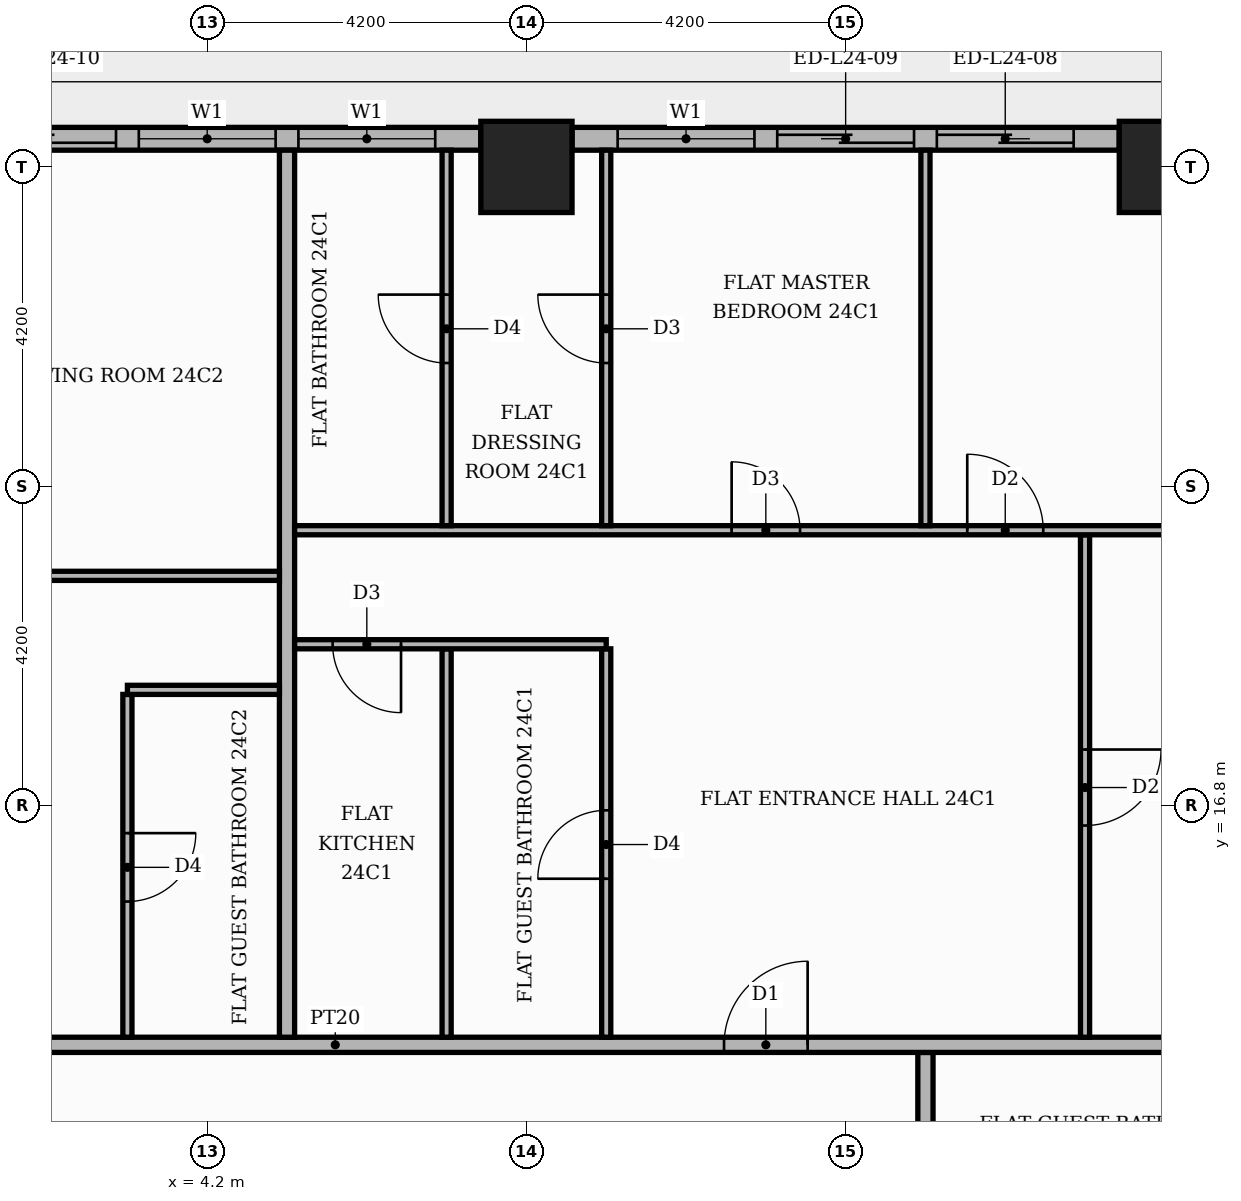
"""IFC4 building model, lengths in metres.
Left out: names, types, materials, properties, quantities, classifications, styles, units other than length and angle.
Written with IfcOpenShell. Run it as: python <this file> out.ifc"""

import sys

from ifc_helpers import new_model, si_unit, direction, frame, frame_2d, origin, origin_2d, place, context, subcontext, project, spatial, rectangle, extrude, element, fill, save


model = new_model("IFC4")
c1 = context("Model", 3, precision=1e-05, world=origin(), true_north=direction((0.0, 1.0)))
c2 = subcontext(c1, "Body", "Model", "MODEL_VIEW")
j1 = project(units=[si_unit("LENGTHUNIT", "METRE"), si_unit("PLANEANGLEUNIT", "RADIAN")], contexts=[c1])
p1 = place(None, origin())
s1 = spatial("IfcSite", under=j1, at=p1, CompositionType="ELEMENT")
p2 = place(p1, origin())
s2 = spatial("IfcBuilding", under=s1, at=p2, CompositionType="ELEMENT")
p3 = place(p2, frame((0.0, 0.0, 102.6)))
s3 = spatial("IfcBuildingStorey", under=s2, at=p3, CompositionType="ELEMENT", Elevation=102.6)
for number, where, z_axis, x_axis in (
    (1, (8.4, 25.2, 0.0), (0.0, 0.0, 1.0), (1.0, 0.0, 0.0)),
    (2, (16.8, 25.2, 0.0), (0.0, 0.0, 1.0), (1.0, 0.0, 0.0)),
):
    element("IfcColumn", number, at=place(p3, frame(where, z_axis=z_axis, x_axis=x_axis)), inside=s3, PredefinedType="COLUMN", context=c2, shape_type="SweptSolid", body=[
        extrude(rectangle(XDim=1.2, YDim=1.2, at=origin_2d()), origin(), (0.0, 0.0, 1.0), 3.9),
    ])
p4 = place(p3, frame((16.2, 25.57, 0.0), z_axis=(0.0, 0.0, 1.0), x_axis=(-1.0, 0.0, 0.0)))
e3 = element("IfcWall", 3, at=p4, inside=s3, PredefinedType="STANDARD", context=c2, shape_type="SweptSolid", body=[
    extrude(rectangle(XDim=7.2, YDim=0.3, at=frame_2d((3.6, 0.0))), origin(), (0.0, 0.0, 1.0), 3.48),
])
p5 = place(p4, frame((0.6, 0.0, 0.0)))
e4 = element("IfcOpeningElement", 4, at=p5, cuts=e3, PredefinedType="OPENING", context=c2, shape_type="SweptSolid", body=[
    extrude(rectangle(XDim=1.8, YDim=2.4, at=frame_2d((0.9, 1.2))), frame((0.0, 0.16, 0.0), z_axis=(0.0, -1.0, 0.0), x_axis=(1.0, 0.0, 0.0)), (0.0, 0.0, 1.0), 0.32),
])
p6 = place(p4, frame((2.7, 0.0, 0.0)))
e5 = element("IfcOpeningElement", 5, at=p6, cuts=e3, PredefinedType="OPENING", context=c2, shape_type="SweptSolid", body=[
    extrude(rectangle(XDim=1.8, YDim=2.4, at=frame_2d((0.9, 1.2))), frame((0.0, 0.16, 0.0), z_axis=(0.0, -1.0, 0.0), x_axis=(1.0, 0.0, 0.0)), (0.0, 0.0, 1.0), 0.32),
])
p7 = place(p4, frame((4.8, 0.0, 0.9)))
e6 = element("IfcOpeningElement", 6, at=p7, cuts=e3, PredefinedType="OPENING", context=c2, shape_type="SweptSolid", body=[
    extrude(rectangle(XDim=1.8, YDim=2.1, at=frame_2d((0.9, 1.05))), frame((0.0, 0.16, 0.0), z_axis=(0.0, -1.0, 0.0), x_axis=(1.0, 0.0, 0.0)), (0.0, 0.0, 1.0), 0.32),
])
p8 = place(p3, frame((7.8, 25.57, 0.0), z_axis=(0.0, 0.0, 1.0), x_axis=(-1.0, 0.0, 0.0)))
e7 = element("IfcWall", 7, at=p8, inside=s3, PredefinedType="STANDARD", context=c2, shape_type="SweptSolid", body=[
    extrude(rectangle(XDim=7.2, YDim=0.3, at=frame_2d((3.6, 0.0))), origin(), (0.0, 0.0, 1.0), 3.48),
])
p9 = place(p8, frame((0.6, 0.0, 0.9)))
e8 = element("IfcOpeningElement", 8, at=p9, cuts=e7, PredefinedType="OPENING", context=c2, shape_type="SweptSolid", body=[
    extrude(rectangle(XDim=1.8, YDim=2.1, at=frame_2d((0.9, 1.05))), frame((0.0, 0.16, 0.0), z_axis=(0.0, -1.0, 0.0), x_axis=(1.0, 0.0, 0.0)), (0.0, 0.0, 1.0), 0.32),
])
p10 = place(p8, frame((2.7, 0.0, 0.9)))
e9 = element("IfcOpeningElement", 9, at=p10, cuts=e7, PredefinedType="OPENING", context=c2, shape_type="SweptSolid", body=[
    extrude(rectangle(XDim=1.8, YDim=2.1, at=frame_2d((0.9, 1.05))), frame((0.0, 0.16, 0.0), z_axis=(0.0, -1.0, 0.0), x_axis=(1.0, 0.0, 0.0)), (0.0, 0.0, 1.0), 0.32),
])
p11 = place(p8, frame((4.8, 0.0, 0.0)))
e10 = element("IfcOpeningElement", 10, at=p11, cuts=e7, PredefinedType="OPENING", context=c2, shape_type="SweptSolid", body=[
    extrude(rectangle(XDim=1.8, YDim=2.4, at=frame_2d((0.9, 1.2))), frame((0.0, 0.16, 0.0), z_axis=(0.0, -1.0, 0.0), x_axis=(1.0, 0.0, 0.0)), (0.0, 0.0, 1.0), 0.32),
])
p12 = place(p3, frame((13.65, -5.15, 0.0), z_axis=(0.0, 0.0, 1.0), x_axis=(0.0, 1.0, 0.0)))
e11 = element("IfcWall", 11, at=p12, inside=s3, PredefinedType="PARTITIONING", context=c2, shape_type="SweptSolid", body=[
    extrude(rectangle(XDim=18.7, YDim=0.2, at=frame_2d((9.35, 0.0))), origin(), (0.0, 0.0, 1.0), 3.48),
])
p13 = place(p12, frame((1.45, 0.0, 0.0)))
e12 = element("IfcOpeningElement", 12, at=p13, cuts=e11, PredefinedType="OPENING", context=c2, shape_type="SweptSolid", body=[
    extrude(rectangle(XDim=1.1, YDim=2.4, at=frame_2d((0.55, 1.2))), frame((0.0, 0.11, 0.0), z_axis=(0.0, -1.0, 0.0), x_axis=(1.0, 0.0, 0.0)), (0.0, 0.0, 1.0), 0.22),
])
p14 = place(p3, frame((-13.65, 13.65, 0.0), z_axis=(0.0, 0.0, 1.0), x_axis=(1.0, 0.0, 0.0)))
e13 = element("IfcWall", 13, at=p14, inside=s3, PredefinedType="PARTITIONING", context=c2, shape_type="SweptSolid", body=[
    extrude(rectangle(XDim=39.07, YDim=0.2, at=frame_2d((19.535, 0.0))), origin(), (0.0, 0.0, 1.0), 3.48),
])
p15 = place(p14, frame((24.65, 0.0, 0.0)))
e14 = element("IfcOpeningElement", 14, at=p15, cuts=e13, PredefinedType="OPENING", context=c2, shape_type="SweptSolid", body=[
    extrude(rectangle(XDim=1.1, YDim=2.4, at=frame_2d((0.55, 1.2))), frame((0.0, 0.11, 0.0), z_axis=(0.0, -1.0, 0.0), x_axis=(1.0, 0.0, 0.0)), (0.0, 0.0, 1.0), 0.22),
])
p16 = place(p14, frame((14.15, 0.0, 0.0)))
e15 = element("IfcOpeningElement", 15, at=p16, cuts=e13, PredefinedType="OPENING", context=c2, shape_type="SweptSolid", body=[
    extrude(rectangle(XDim=1.1, YDim=2.4, at=frame_2d((0.55, 1.2))), frame((0.0, 0.11, 0.0), z_axis=(0.0, -1.0, 0.0), x_axis=(1.0, 0.0, 0.0)), (0.0, 0.0, 1.0), 0.22),
])
p17 = place(p3, frame((3.15, 13.75, 0.0), z_axis=(0.0, 0.0, 1.0), x_axis=(0.0, 1.0, 0.0)))
e16 = element("IfcWall", 16, at=p17, inside=s3, PredefinedType="PARTITIONING", context=c2, shape_type="SweptSolid", body=[
    extrude(rectangle(XDim=4.51, YDim=0.12, at=frame_2d((2.255, 0.0))), origin(), (0.0, 0.0, 1.0), 3.48),
])
p18 = place(p17, frame((1.785, 0.0, 0.0)))
e17 = element("IfcOpeningElement", 17, at=p18, cuts=e16, PredefinedType="OPENING", context=c2, shape_type="SweptSolid", body=[
    extrude(rectangle(XDim=0.9, YDim=2.1, at=frame_2d((0.45, 1.05))), frame((0.0, 0.07, 0.0), z_axis=(0.0, -1.0, 0.0), x_axis=(1.0, 0.0, 0.0)), (0.0, 0.0, 1.0), 0.14),
])
p19 = place(p3, frame((5.25, 13.75, 0.0), z_axis=(0.0, 0.0, 1.0), x_axis=(0.0, 1.0, 0.0)))
e18 = element("IfcWall", 18, at=p19, inside=s3, PredefinedType="PARTITIONING", context=c2, shape_type="SweptSolid", body=[
    extrude(rectangle(XDim=11.67, YDim=0.2, at=frame_2d((5.835, 0.0))), origin(), (0.0, 0.0, 1.0), 3.48),
])
p20 = place(p3, frame((7.35, 13.75, 0.0), z_axis=(0.0, 0.0, 1.0), x_axis=(0.0, 1.0, 0.0)))
e19 = element("IfcWall", 19, at=p20, inside=s3, PredefinedType="PARTITIONING", context=c2, shape_type="SweptSolid", body=[
    extrude(rectangle(XDim=5.11, YDim=0.12, at=frame_2d((2.555, 0.0))), origin(), (0.0, 0.0, 1.0), 3.48),
])
p21 = place(p3, frame((9.45, 13.75, 0.0), z_axis=(0.0, 0.0, 1.0), x_axis=(0.0, 1.0, 0.0)))
e20 = element("IfcWall", 20, at=p21, inside=s3, PredefinedType="PARTITIONING", context=c2, shape_type="SweptSolid", body=[
    extrude(rectangle(XDim=5.11, YDim=0.12, at=frame_2d((2.555, 0.0))), origin(), (0.0, 0.0, 1.0), 3.48),
])
p22 = place(p21, frame((2.085, 0.0, 0.0)))
e21 = element("IfcOpeningElement", 21, at=p22, cuts=e20, PredefinedType="OPENING", context=c2, shape_type="SweptSolid", body=[
    extrude(rectangle(XDim=0.9, YDim=2.1, at=frame_2d((0.45, 1.05))), frame((0.0, 0.07, 0.0), z_axis=(0.0, -1.0, 0.0), x_axis=(1.0, 0.0, 0.0)), (0.0, 0.0, 1.0), 0.14),
])
p23 = place(p3, frame((15.75, 13.75, 0.0), z_axis=(0.0, 0.0, 1.0), x_axis=(0.0, 1.0, 0.0)))
e22 = element("IfcWall", 22, at=p23, inside=s3, PredefinedType="PARTITIONING", context=c2, shape_type="SweptSolid", body=[
    extrude(rectangle(XDim=6.61, YDim=0.12, at=frame_2d((3.305, 0.0))), origin(), (0.0, 0.0, 1.0), 3.48),
])
p24 = place(p23, frame((2.785, 0.0, 0.0)))
e23 = element("IfcOpeningElement", 23, at=p24, cuts=e22, PredefinedType="OPENING", context=c2, shape_type="SweptSolid", body=[
    extrude(rectangle(XDim=1.0, YDim=2.1, at=frame_2d((0.5, 1.05))), frame((0.0, 0.07, 0.0), z_axis=(0.0, -1.0, 0.0), x_axis=(1.0, 0.0, 0.0)), (0.0, 0.0, 1.0), 0.14),
])
p25 = place(p3, frame((3.15, 18.32, 0.0), z_axis=(0.0, 0.0, 1.0), x_axis=(1.0, 0.0, 0.0)))
e24 = element("IfcWall", 24, at=p25, inside=s3, PredefinedType="PARTITIONING", context=c2, shape_type="SweptSolid", body=[
    extrude(rectangle(XDim=2.0, YDim=0.12, at=frame_2d((1.0, 0.0))), origin(), (0.0, 0.0, 1.0), 3.48),
])
p26 = place(p3, frame((5.35, 18.92, 0.0), z_axis=(0.0, 0.0, 1.0), x_axis=(1.0, 0.0, 0.0)))
e25 = element("IfcWall", 25, at=p26, inside=s3, PredefinedType="PARTITIONING", context=c2, shape_type="SweptSolid", body=[
    extrude(rectangle(XDim=4.1, YDim=0.12, at=frame_2d((2.05, 0.0))), origin(), (0.0, 0.0, 1.0), 3.48),
])
p27 = place(p26, frame((0.5, 0.0, 0.0)))
e26 = element("IfcOpeningElement", 26, at=p27, cuts=e25, PredefinedType="OPENING", context=c2, shape_type="SweptSolid", body=[
    extrude(rectangle(XDim=0.9, YDim=2.1, at=frame_2d((0.45, 1.05))), frame((0.0, 0.07, 0.0), z_axis=(0.0, -1.0, 0.0), x_axis=(1.0, 0.0, 0.0)), (0.0, 0.0, 1.0), 0.14),
])
p28 = place(p3, frame((-13.55, 19.82, 0.0), z_axis=(0.0, 0.0, 1.0), x_axis=(1.0, 0.0, 0.0)))
e27 = element("IfcWall", 27, at=p28, inside=s3, PredefinedType="PARTITIONING", context=c2, shape_type="SweptSolid", body=[
    extrude(rectangle(XDim=18.7, YDim=0.12, at=frame_2d((9.35, 0.0))), origin(), (0.0, 0.0, 1.0), 3.48),
])
p29 = place(p28, frame((14.1, 0.0, 0.0)))
e28 = element("IfcOpeningElement", 28, at=p29, cuts=e27, PredefinedType="OPENING", context=c2, shape_type="SweptSolid", body=[
    extrude(rectangle(XDim=1.0, YDim=2.1, at=frame_2d((0.5, 1.05))), frame((0.0, 0.07, 0.0), z_axis=(0.0, -1.0, 0.0), x_axis=(1.0, 0.0, 0.0)), (0.0, 0.0, 1.0), 0.14),
])
p30 = place(p28, frame((6.8, 0.0, 0.0)))
e29 = element("IfcOpeningElement", 29, at=p30, cuts=e27, PredefinedType="OPENING", context=c2, shape_type="SweptSolid", body=[
    extrude(rectangle(XDim=0.9, YDim=2.1, at=frame_2d((0.45, 1.05))), frame((0.0, 0.07, 0.0), z_axis=(0.0, -1.0, 0.0), x_axis=(1.0, 0.0, 0.0)), (0.0, 0.0, 1.0), 0.14),
])
p31 = place(p3, frame((5.35, 20.42, 0.0), z_axis=(0.0, 0.0, 1.0), x_axis=(1.0, 0.0, 0.0)))
e30 = element("IfcWall", 30, at=p31, inside=s3, PredefinedType="PARTITIONING", context=c2, shape_type="SweptSolid", body=[
    extrude(rectangle(XDim=20.07, YDim=0.12, at=frame_2d((10.035, 0.0))), origin(), (0.0, 0.0, 1.0), 3.48),
])
p32 = place(p31, frame((8.85, 0.0, 0.0)))
e31 = element("IfcOpeningElement", 31, at=p32, cuts=e30, PredefinedType="OPENING", context=c2, shape_type="SweptSolid", body=[
    extrude(rectangle(XDim=1.0, YDim=2.1, at=frame_2d((0.5, 1.05))), frame((0.0, 0.07, 0.0), z_axis=(0.0, -1.0, 0.0), x_axis=(1.0, 0.0, 0.0)), (0.0, 0.0, 1.0), 0.14),
])
p33 = place(p31, frame((5.75, 0.0, 0.0)))
e32 = element("IfcOpeningElement", 32, at=p33, cuts=e30, PredefinedType="OPENING", context=c2, shape_type="SweptSolid", body=[
    extrude(rectangle(XDim=0.9, YDim=2.1, at=frame_2d((0.45, 1.05))), frame((0.0, 0.07, 0.0), z_axis=(0.0, -1.0, 0.0), x_axis=(1.0, 0.0, 0.0)), (0.0, 0.0, 1.0), 0.14),
])
p34 = place(p3, frame((7.35, 20.48, 0.0), z_axis=(0.0, 0.0, 1.0), x_axis=(0.0, 1.0, 0.0)))
e33 = element("IfcWall", 33, at=p34, inside=s3, PredefinedType="PARTITIONING", context=c2, shape_type="SweptSolid", body=[
    extrude(rectangle(XDim=4.94, YDim=0.12, at=frame_2d((2.47, 0.0))), origin(), (0.0, 0.0, 1.0), 3.48),
])
p35 = place(p34, frame((2.14, 0.0, 0.0)))
e34 = element("IfcOpeningElement", 34, at=p35, cuts=e33, PredefinedType="OPENING", context=c2, shape_type="SweptSolid", body=[
    extrude(rectangle(XDim=0.9, YDim=2.1, at=frame_2d((0.45, 1.05))), frame((0.0, 0.07, 0.0), z_axis=(0.0, -1.0, 0.0), x_axis=(1.0, 0.0, 0.0)), (0.0, 0.0, 1.0), 0.14),
])
p36 = place(p3, frame((9.45, 20.48, 0.0), z_axis=(0.0, 0.0, 1.0), x_axis=(0.0, 1.0, 0.0)))
e35 = element("IfcWall", 35, at=p36, inside=s3, PredefinedType="PARTITIONING", context=c2, shape_type="SweptSolid", body=[
    extrude(rectangle(XDim=4.94, YDim=0.12, at=frame_2d((2.47, 0.0))), origin(), (0.0, 0.0, 1.0), 3.48),
])
p37 = place(p36, frame((2.14, 0.0, 0.0)))
e36 = element("IfcOpeningElement", 36, at=p37, cuts=e35, PredefinedType="OPENING", context=c2, shape_type="SweptSolid", body=[
    extrude(rectangle(XDim=0.9, YDim=2.1, at=frame_2d((0.45, 1.05))), frame((0.0, 0.07, 0.0), z_axis=(0.0, -1.0, 0.0), x_axis=(1.0, 0.0, 0.0)), (0.0, 0.0, 1.0), 0.14),
])
p38 = place(p3, frame((13.65, 20.48, 0.0), z_axis=(0.0, 0.0, 1.0), x_axis=(0.0, 1.0, 0.0)))
e37 = element("IfcWall", 37, at=p38, inside=s3, PredefinedType="PARTITIONING", context=c2, shape_type="SweptSolid", body=[
    extrude(rectangle(XDim=4.94, YDim=0.12, at=frame_2d((2.47, 0.0))), origin(), (0.0, 0.0, 1.0), 3.48),
])
p39 = place(p5, origin())
e38 = element("IfcDoor", 38, at=p39, inside=s3, OperationType="SLIDING_TO_LEFT", PredefinedType="DOOR", context=c2, shape_type="SweptSolid", body=[
    extrude(rectangle(XDim=1.8, YDim=2.4, at=frame_2d((0.9, 1.2))), frame((0.0, 0.025, 0.0), z_axis=(0.0, -1.0, 0.0), x_axis=(1.0, 0.0, 0.0)), (0.0, 0.0, 1.0), 0.05),
])
fill(e4, e38)
p40 = place(p6, origin())
e39 = element("IfcDoor", 39, at=p40, inside=s3, OperationType="SLIDING_TO_RIGHT", PredefinedType="DOOR", context=c2, shape_type="SweptSolid", body=[
    extrude(rectangle(XDim=1.8, YDim=2.4, at=frame_2d((0.9, 1.2))), frame((0.0, 0.025, 0.0), z_axis=(0.0, -1.0, 0.0), x_axis=(1.0, 0.0, 0.0)), (0.0, 0.0, 1.0), 0.05),
])
fill(e5, e39)
p41 = place(p7, origin())
e40 = element("IfcWindow", 40, at=p41, inside=s3, PartitioningType="SINGLE_PANEL", PredefinedType="WINDOW", context=c2, shape_type="SweptSolid", body=[
    extrude(rectangle(XDim=1.8, YDim=2.1, at=frame_2d((0.9, 1.05))), frame((0.0, 0.03, 0.0), z_axis=(0.0, -1.0, 0.0), x_axis=(1.0, 0.0, 0.0)), (0.0, 0.0, 1.0), 0.06),
])
fill(e6, e40)
p42 = place(p9, origin())
e41 = element("IfcWindow", 41, at=p42, inside=s3, PartitioningType="SINGLE_PANEL", PredefinedType="WINDOW", context=c2, shape_type="SweptSolid", body=[
    extrude(rectangle(XDim=1.8, YDim=2.1, at=frame_2d((0.9, 1.05))), frame((0.0, 0.03, 0.0), z_axis=(0.0, -1.0, 0.0), x_axis=(1.0, 0.0, 0.0)), (0.0, 0.0, 1.0), 0.06),
])
fill(e8, e41)
p43 = place(p10, origin())
e42 = element("IfcWindow", 42, at=p43, inside=s3, PartitioningType="SINGLE_PANEL", PredefinedType="WINDOW", context=c2, shape_type="SweptSolid", body=[
    extrude(rectangle(XDim=1.8, YDim=2.1, at=frame_2d((0.9, 1.05))), frame((0.0, 0.03, 0.0), z_axis=(0.0, -1.0, 0.0), x_axis=(1.0, 0.0, 0.0)), (0.0, 0.0, 1.0), 0.06),
])
fill(e9, e42)
p44 = place(p11, origin())
e43 = element("IfcDoor", 43, at=p44, inside=s3, OperationType="SLIDING_TO_RIGHT", PredefinedType="DOOR", context=c2, shape_type="SweptSolid", body=[
    extrude(rectangle(XDim=1.8, YDim=2.4, at=frame_2d((0.9, 1.2))), frame((0.0, 0.025, 0.0), z_axis=(0.0, -1.0, 0.0), x_axis=(1.0, 0.0, 0.0)), (0.0, 0.0, 1.0), 0.05),
])
fill(e10, e43)
p45 = place(p15, origin())
e44 = element("IfcDoor", 44, at=p45, inside=s3, OperationType="SINGLE_SWING_RIGHT", PredefinedType="DOOR", context=c2, shape_type="SweptSolid", body=[
    extrude(rectangle(XDim=1.1, YDim=2.4, at=frame_2d((0.55, 1.2))), frame((0.0, 0.025, 0.0), z_axis=(0.0, -1.0, 0.0), x_axis=(1.0, 0.0, 0.0)), (0.0, 0.0, 1.0), 0.05),
])
fill(e14, e44)
p46 = place(p24, frame((1.0, 0.0, 0.0), z_axis=(0.0, 0.0, 1.0), x_axis=(-1.0, 0.0, 0.0)))
e45 = element("IfcDoor", 45, at=p46, inside=s3, OperationType="SINGLE_SWING_RIGHT", PredefinedType="DOOR", context=c2, shape_type="SweptSolid", body=[
    extrude(rectangle(XDim=1.0, YDim=2.1, at=frame_2d((0.5, 1.05))), frame((0.0, 0.025, 0.0), z_axis=(0.0, -1.0, 0.0), x_axis=(1.0, 0.0, 0.0)), (0.0, 0.0, 1.0), 0.05),
])
fill(e23, e45)
p47 = place(p22, origin())
e46 = element("IfcDoor", 46, at=p47, inside=s3, OperationType="SINGLE_SWING_LEFT", PredefinedType="DOOR", context=c2, shape_type="SweptSolid", body=[
    extrude(rectangle(XDim=0.9, YDim=2.1, at=frame_2d((0.45, 1.05))), frame((0.0, 0.025, 0.0), z_axis=(0.0, -1.0, 0.0), x_axis=(1.0, 0.0, 0.0)), (0.0, 0.0, 1.0), 0.05),
])
fill(e21, e46)
p48 = place(p27, frame((0.9, 0.0, 0.0), z_axis=(0.0, 0.0, 1.0), x_axis=(-1.0, 0.0, 0.0)))
e47 = element("IfcDoor", 47, at=p48, inside=s3, OperationType="SINGLE_SWING_RIGHT", PredefinedType="DOOR", context=c2, shape_type="SweptSolid", body=[
    extrude(rectangle(XDim=0.9, YDim=2.1, at=frame_2d((0.45, 1.05))), frame((0.0, 0.025, 0.0), z_axis=(0.0, -1.0, 0.0), x_axis=(1.0, 0.0, 0.0)), (0.0, 0.0, 1.0), 0.05),
])
fill(e26, e47)
p49 = place(p32, origin())
e48 = element("IfcDoor", 48, at=p49, inside=s3, OperationType="SINGLE_SWING_LEFT", PredefinedType="DOOR", context=c2, shape_type="SweptSolid", body=[
    extrude(rectangle(XDim=1.0, YDim=2.1, at=frame_2d((0.5, 1.05))), frame((0.0, 0.025, 0.0), z_axis=(0.0, -1.0, 0.0), x_axis=(1.0, 0.0, 0.0)), (0.0, 0.0, 1.0), 0.05),
])
fill(e31, e48)
p50 = place(p33, origin())
e49 = element("IfcDoor", 49, at=p50, inside=s3, OperationType="SINGLE_SWING_LEFT", PredefinedType="DOOR", context=c2, shape_type="SweptSolid", body=[
    extrude(rectangle(XDim=0.9, YDim=2.1, at=frame_2d((0.45, 1.05))), frame((0.0, 0.025, 0.0), z_axis=(0.0, -1.0, 0.0), x_axis=(1.0, 0.0, 0.0)), (0.0, 0.0, 1.0), 0.05),
])
fill(e32, e49)
p51 = place(p37, origin())
e50 = element("IfcDoor", 50, at=p51, inside=s3, OperationType="SINGLE_SWING_RIGHT", PredefinedType="DOOR", context=c2, shape_type="SweptSolid", body=[
    extrude(rectangle(XDim=0.9, YDim=2.1, at=frame_2d((0.45, 1.05))), frame((0.0, 0.025, 0.0), z_axis=(0.0, -1.0, 0.0), x_axis=(1.0, 0.0, 0.0)), (0.0, 0.0, 1.0), 0.05),
])
fill(e36, e50)
p52 = place(p35, origin())
e51 = element("IfcDoor", 51, at=p52, inside=s3, OperationType="SINGLE_SWING_RIGHT", PredefinedType="DOOR", context=c2, shape_type="SweptSolid", body=[
    extrude(rectangle(XDim=0.9, YDim=2.1, at=frame_2d((0.45, 1.05))), frame((0.0, 0.025, 0.0), z_axis=(0.0, -1.0, 0.0), x_axis=(1.0, 0.0, 0.0)), (0.0, 0.0, 1.0), 0.05),
])
fill(e34, e51)
p53 = place(p18, frame((0.9, 0.0, 0.0), z_axis=(0.0, 0.0, 1.0), x_axis=(-1.0, 0.0, 0.0)))
e52 = element("IfcDoor", 52, at=p53, inside=s3, OperationType="SINGLE_SWING_RIGHT", PredefinedType="DOOR", context=c2, shape_type="SweptSolid", body=[
    extrude(rectangle(XDim=0.9, YDim=2.1, at=frame_2d((0.45, 1.05))), frame((0.0, 0.025, 0.0), z_axis=(0.0, -1.0, 0.0), x_axis=(1.0, 0.0, 0.0)), (0.0, 0.0, 1.0), 0.05),
])
fill(e17, e52)
save(model, sys.argv[1])
